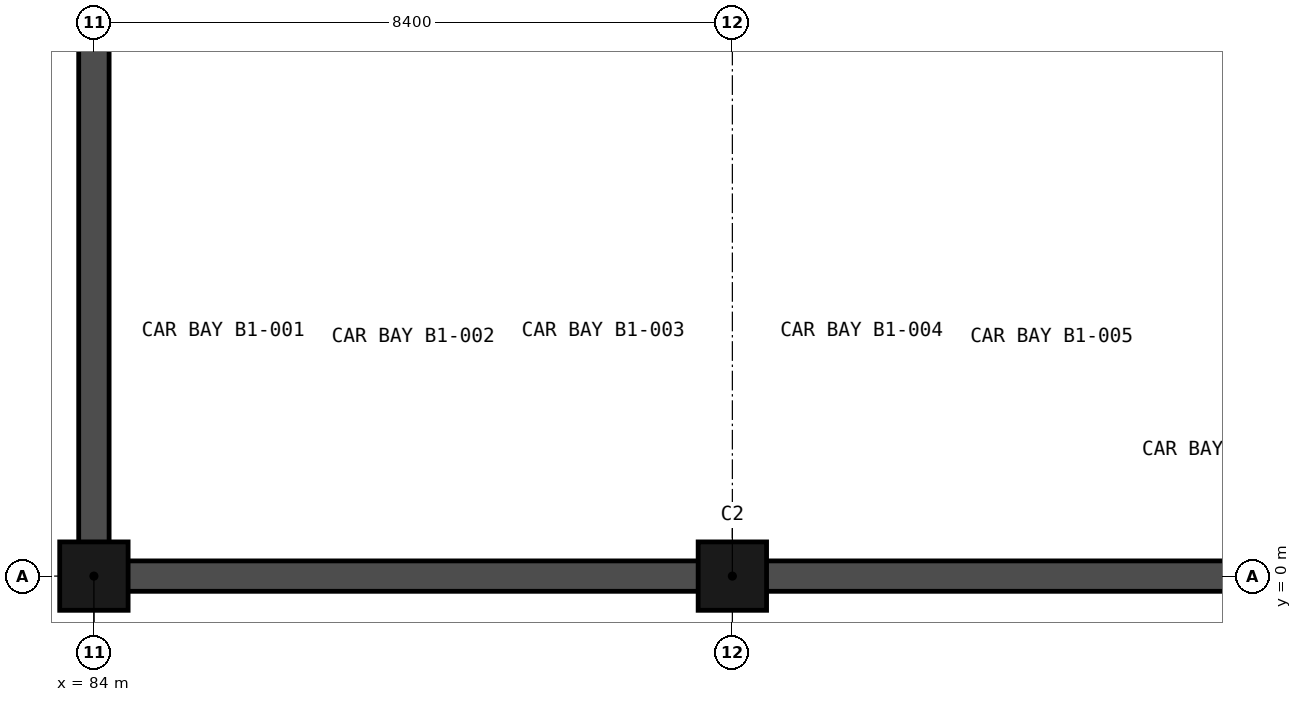
"""IFC4 building model, lengths in metres.
Left out: names, types, materials, properties, quantities, classifications, styles, units other than length and angle.
Written with IfcOpenShell. Run it as: python <this file> out.ifc"""

import sys

from ifc_helpers import new_model, si_unit, direction, frame, frame_2d, origin, origin_2d, place, context, subcontext, project, spatial, rectangle, extrude, element, save


model = new_model("IFC4")
c1 = context("Model", 3, precision=1e-05, world=origin(), true_north=direction((0.0, 1.0)))
c2 = subcontext(c1, "Body", "Model", "MODEL_VIEW")
j1 = project(units=[si_unit("LENGTHUNIT", "METRE"), si_unit("PLANEANGLEUNIT", "RADIAN")], contexts=[c1])
p1 = place(None, origin())
s1 = spatial("IfcSite", under=j1, at=p1, CompositionType="ELEMENT")
p2 = place(p1, origin())
s2 = spatial("IfcBuilding", under=s1, at=p2, CompositionType="ELEMENT")
p3 = place(p2, frame((0.0, 0.0, -4.8)))
s3 = spatial("IfcBuildingStorey", under=s2, at=p3, CompositionType="ELEMENT", Elevation=-4.8)
for number, where, z_axis, x_axis in (
    (1, (84.0, 0.0, -0.3), (0.0, 0.0, 1.0), (1.0, 0.0, 0.0)),
    (2, (92.4, 0.0, -0.3), (0.0, 0.0, 1.0), (1.0, 0.0, 0.0)),
):
    element("IfcColumn", number, at=place(p3, frame(where, z_axis=z_axis, x_axis=x_axis)), inside=s3, PredefinedType="COLUMN", context=c2, shape_type="SweptSolid", body=[
        extrude(rectangle(XDim=0.9, YDim=0.9, at=origin_2d()), origin(), (0.0, 0.0, 1.0), 4.8),
    ])
p4 = place(p3, frame((83.8, 0.0, -0.3), z_axis=(0.0, 0.0, 1.0), x_axis=(1.0, 0.0, 0.0)))
e3 = element("IfcWall", 3, at=p4, inside=s3, PredefinedType="SOLIDWALL", context=c2, shape_type="SweptSolid", body=[
    extrude(rectangle(XDim=84.4, YDim=0.4, at=frame_2d((42.2, 0.0))), origin(), (0.0, 0.0, 1.0), 4.8),
])
p5 = place(p3, frame((84.0, 50.6, -0.3), z_axis=(0.0, 0.0, 1.0), x_axis=(0.0, -1.0, 0.0)))
e4 = element("IfcWall", 4, at=p5, inside=s3, PredefinedType="SOLIDWALL", context=c2, shape_type="SweptSolid", body=[
    extrude(rectangle(XDim=50.8, YDim=0.4, at=frame_2d((25.4, 0.0))), origin(), (0.0, 0.0, 1.0), 4.8),
])
save(model, sys.argv[1])
